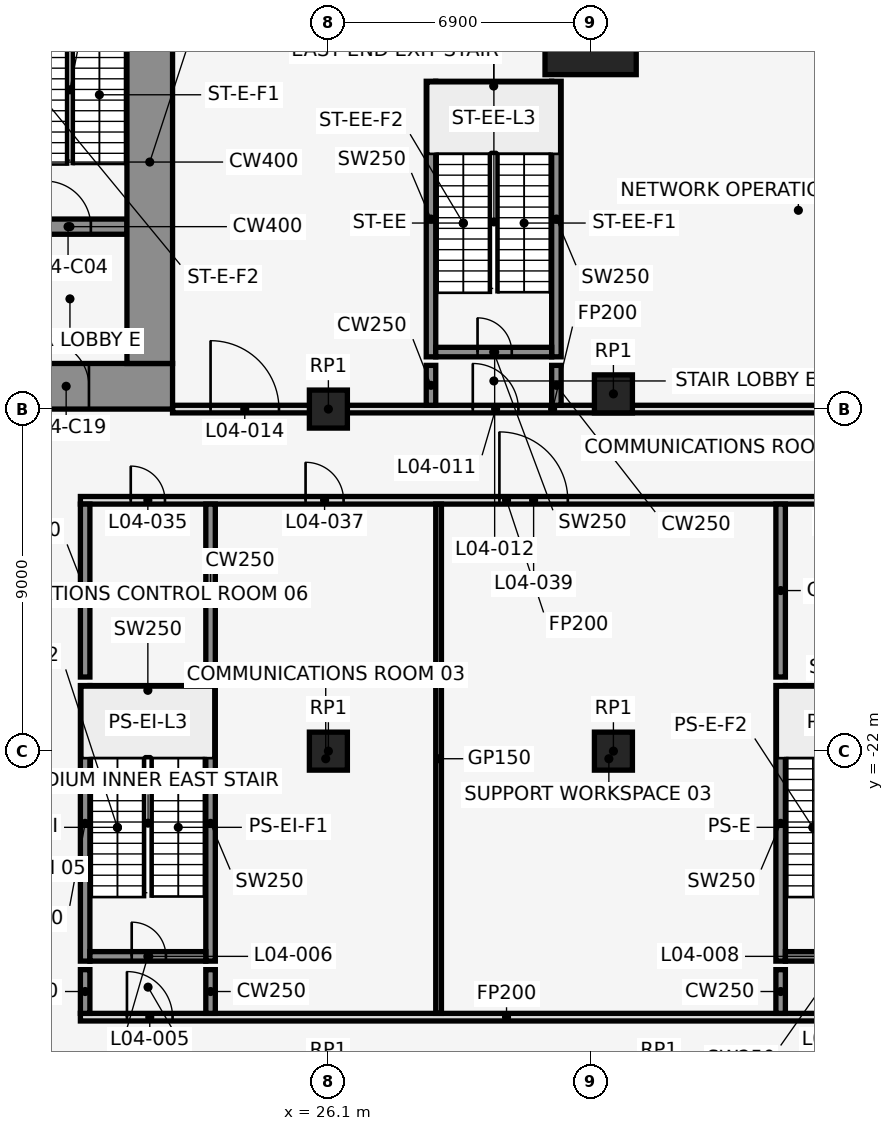
"""IFC4 building model, lengths in metres.
Left out: names, types, materials, properties, quantities, classifications, styles, units other than length and angle.
Written with IfcOpenShell. Run it as: python <this file> out.ifc"""

import sys

from ifc_helpers import new_model, si_unit, direction, frame, frame_2d, origin, origin_2d, place, context, subcontext, project, spatial, rectangle, extrude, element, fill, save


model = new_model("IFC4")
c1 = context("Model", 3, precision=1e-05, world=origin(), true_north=direction((0.0, 1.0)))
c2 = subcontext(c1, "Body", "Model", "MODEL_VIEW")
j1 = project(units=[si_unit("LENGTHUNIT", "METRE"), si_unit("PLANEANGLEUNIT", "RADIAN")], contexts=[c1])
p1 = place(None, origin())
s1 = spatial("IfcSite", under=j1, at=p1, CompositionType="ELEMENT")
p2 = place(p1, origin())
s2 = spatial("IfcBuilding", under=s1, at=p2, CompositionType="ELEMENT")
p3 = place(p2, frame((0.0, 0.0, 25.0)))
s3 = spatial("IfcBuildingStorey", under=s2, at=p3, CompositionType="ELEMENT", Elevation=25.0)
p4 = place(p3, frame((33.0, -3.0, 0.0), z_axis=(0.0, 0.0, 1.0), x_axis=(1.0, 0.0, 0.0)))
e1 = element("IfcColumn", 1, at=p4, inside=s3, PredefinedType="COLUMN", context=c2, shape_type="SweptSolid", body=[
    extrude(rectangle(XDim=2.4, YDim=2.4, at=origin_2d()), origin(), (0.0, 0.0, 1.0), 5.0),
])
for number, where, z_axis, x_axis in (
    (2, (33.6, -12.6, 0.0), (0.0, 0.0, 1.0), (1.0, 0.0, 0.0)),
    (3, (33.6, -22.0, 0.0), (0.0, 0.0, 1.0), (1.0, 0.0, 0.0)),
    (4, (26.1, -22.0, 0.0), (0.0, 0.0, 1.0), (1.0, 0.0, 0.0)),
    (5, (26.1, -13.0, 0.0), (0.0, 0.0, 1.0), (1.0, 0.0, 0.0)),
):
    element("IfcColumn", number, at=place(p3, frame(where, z_axis=z_axis, x_axis=x_axis)), inside=s3, PredefinedType="COLUMN", context=c2, shape_type="SweptSolid", body=[
        extrude(rectangle(XDim=1.0, YDim=1.0, at=origin_2d()), origin(), (0.0, 0.0, 1.0), 5.0),
    ])
for number, where, z_axis, x_axis in (
    (6, (28.8, -11.625, 0.0), (0.0, 0.0, 1.0), (0.0, 1.0, 0.0)),
    (7, (32.1, -11.625, 0.0), (0.0, 0.0, 1.0), (0.0, 1.0, 0.0)),
):
    element("IfcWall", number, at=place(p3, frame(where, z_axis=z_axis, x_axis=x_axis)), inside=s3, PredefinedType="SHEAR", context=c2, shape_type="SweptSolid", body=[
        extrude(rectangle(XDim=7.25, YDim=0.25, at=frame_2d((3.625, 0.0))), origin(), (0.0, 0.0, 1.0), 5.0),
    ])
p5 = place(p3, frame((28.925, -11.5, 0.0), z_axis=(0.0, 0.0, 1.0), x_axis=(1.0, 0.0, 0.0)))
e8 = element("IfcWall", 8, at=p5, inside=s3, PredefinedType="SHEAR", context=c2, shape_type="SweptSolid", body=[
    extrude(rectangle(XDim=3.05, YDim=0.25, at=frame_2d((1.525, 0.0))), origin(), (0.0, 0.0, 1.0), 5.0),
])
p6 = place(p5, frame((1.1, 0.0, 0.0)))
e9 = element("IfcOpeningElement", 9, at=p6, cuts=e8, PredefinedType="OPENING", context=c2, shape_type="SweptSolid", body=[
    extrude(rectangle(XDim=0.9, YDim=2.1, at=frame_2d((0.45, 1.05))), frame((0.0, 0.137, 0.0), z_axis=(0.0, -1.0, 0.0), x_axis=(1.0, 0.0, 0.0)), (0.0, 0.0, 1.0), 0.274),
])
p7 = place(p3, frame((28.925, -4.5, 0.0), z_axis=(0.0, 0.0, 1.0), x_axis=(1.0, 0.0, 0.0)))
e10 = element("IfcWall", 10, at=p7, inside=s3, PredefinedType="SHEAR", context=c2, shape_type="SweptSolid", body=[
    extrude(rectangle(XDim=3.05, YDim=0.25, at=frame_2d((1.525, 0.0))), origin(), (0.0, 0.0, 1.0), 5.0),
])
for number, where, z_axis, x_axis in (
    (11, (19.7, -27.525, 0.0), (0.0, 0.0, 1.0), (0.0, 1.0, 0.0)),
    (12, (23.0, -27.525, 0.0), (0.0, 0.0, 1.0), (0.0, 1.0, 0.0)),
):
    element("IfcWall", number, at=place(p3, frame(where, z_axis=z_axis, x_axis=x_axis)), inside=s3, PredefinedType="SHEAR", context=c2, shape_type="SweptSolid", body=[
        extrude(rectangle(XDim=7.25, YDim=0.25, at=frame_2d((3.625, 0.0))), origin(), (0.0, 0.0, 1.0), 5.0),
    ])
p8 = place(p3, frame((19.825, -27.4, 0.0), z_axis=(0.0, 0.0, 1.0), x_axis=(1.0, 0.0, 0.0)))
e13 = element("IfcWall", 13, at=p8, inside=s3, PredefinedType="SHEAR", context=c2, shape_type="SweptSolid", body=[
    extrude(rectangle(XDim=3.05, YDim=0.25, at=frame_2d((1.525, 0.0))), origin(), (0.0, 0.0, 1.0), 5.0),
])
p9 = place(p8, frame((1.1, 0.0, 0.0)))
e14 = element("IfcOpeningElement", 14, at=p9, cuts=e13, PredefinedType="OPENING", context=c2, shape_type="SweptSolid", body=[
    extrude(rectangle(XDim=0.9, YDim=2.1, at=frame_2d((0.45, 1.05))), frame((0.0, 0.137, 0.0), z_axis=(0.0, -1.0, 0.0), x_axis=(1.0, 0.0, 0.0)), (0.0, 0.0, 1.0), 0.274),
])
p10 = place(p3, frame((19.825, -20.4, 0.0), z_axis=(0.0, 0.0, 1.0), x_axis=(1.0, 0.0, 0.0)))
e15 = element("IfcWall", 15, at=p10, inside=s3, PredefinedType="SHEAR", context=c2, shape_type="SweptSolid", body=[
    extrude(rectangle(XDim=3.05, YDim=0.25, at=frame_2d((1.525, 0.0))), origin(), (0.0, 0.0, 1.0), 5.0),
])
p11 = place(p3, frame((38.0, -27.525, 0.0), z_axis=(0.0, 0.0, 1.0), x_axis=(0.0, 1.0, 0.0)))
e16 = element("IfcWall", 16, at=p11, inside=s3, PredefinedType="SHEAR", context=c2, shape_type="SweptSolid", body=[
    extrude(rectangle(XDim=7.25, YDim=0.25, at=frame_2d((3.625, 0.0))), origin(), (0.0, 0.0, 1.0), 5.0),
])
p12 = place(p3, frame((38.125, -27.4, 0.0), z_axis=(0.0, 0.0, 1.0), x_axis=(1.0, 0.0, 0.0)))
e17 = element("IfcWall", 17, at=p12, inside=s3, PredefinedType="SHEAR", context=c2, shape_type="SweptSolid", body=[
    extrude(rectangle(XDim=3.05, YDim=0.25, at=frame_2d((1.525, 0.0))), origin(), (0.0, 0.0, 1.0), 5.0),
])
p13 = place(p12, frame((1.1, 0.0, 0.0)))
e18 = element("IfcOpeningElement", 18, at=p13, cuts=e17, PredefinedType="OPENING", context=c2, shape_type="SweptSolid", body=[
    extrude(rectangle(XDim=0.9, YDim=2.1, at=frame_2d((0.45, 1.05))), frame((0.0, 0.137, 0.0), z_axis=(0.0, -1.0, 0.0), x_axis=(1.0, 0.0, 0.0)), (0.0, 0.0, 1.0), 0.274),
])
p14 = place(p3, frame((38.125, -20.4, 0.0), z_axis=(0.0, 0.0, 1.0), x_axis=(1.0, 0.0, 0.0)))
e19 = element("IfcWall", 19, at=p14, inside=s3, PredefinedType="SHEAR", context=c2, shape_type="SweptSolid", body=[
    extrude(rectangle(XDim=3.05, YDim=0.25, at=frame_2d((1.525, 0.0))), origin(), (0.0, 0.0, 1.0), 5.0),
])
p15 = place(p3, frame((19.575, -29.0, 0.0), z_axis=(0.0, 0.0, 1.0), x_axis=(1.0, 0.0, 0.0)))
e20 = element("IfcWall", 20, at=p15, inside=s3, PredefinedType="PARTITIONING", context=c2, shape_type="SweptSolid", body=[
    extrude(rectangle(XDim=22.425, YDim=0.2, at=frame_2d((11.212, 0.0))), origin(), (0.0, 0.0, 1.0), 4.7),
])
p16 = place(p15, frame((1.225, 0.0, 0.0)))
e21 = element("IfcOpeningElement", 21, at=p16, cuts=e20, PredefinedType="OPENING", context=c2, shape_type="SweptSolid", body=[
    extrude(rectangle(XDim=1.2, YDim=2.1, at=frame_2d((0.6, 1.05))), frame((0.0, 0.112, 0.0), z_axis=(0.0, -1.0, 0.0), x_axis=(1.0, 0.0, 0.0)), (0.0, 0.0, 1.0), 0.224),
])
p17 = place(p15, frame((19.425, 0.0, 0.0)))
e22 = element("IfcOpeningElement", 22, at=p17, cuts=e20, PredefinedType="OPENING", context=c2, shape_type="SweptSolid", body=[
    extrude(rectangle(XDim=1.2, YDim=2.1, at=frame_2d((0.6, 1.05))), frame((0.0, 0.112, 0.0), z_axis=(0.0, -1.0, 0.0), x_axis=(1.0, 0.0, 0.0)), (0.0, 0.0, 1.0), 0.224),
])
p18 = place(p3, frame((19.575, -15.4, 0.0), z_axis=(0.0, 0.0, 1.0), x_axis=(1.0, 0.0, 0.0)))
e23 = element("IfcWall", 23, at=p18, inside=s3, PredefinedType="PARTITIONING", context=c2, shape_type="SweptSolid", body=[
    extrude(rectangle(XDim=22.425, YDim=0.2, at=frame_2d((11.212, 0.0))), origin(), (0.0, 0.0, 1.0), 4.7),
])
p19 = place(p18, frame((1.325, 0.0, 0.0)))
e24 = element("IfcOpeningElement", 24, at=p19, cuts=e23, PredefinedType="OPENING", context=c2, shape_type="SweptSolid", body=[
    extrude(rectangle(XDim=0.9, YDim=2.1, at=frame_2d((0.45, 1.05))), frame((0.0, 0.112, 0.0), z_axis=(0.0, -1.0, 0.0), x_axis=(1.0, 0.0, 0.0)), (0.0, 0.0, 1.0), 0.224),
])
p20 = place(p18, frame((5.925, 0.0, 0.0)))
e25 = element("IfcOpeningElement", 25, at=p20, cuts=e23, PredefinedType="OPENING", context=c2, shape_type="SweptSolid", body=[
    extrude(rectangle(XDim=1.0, YDim=2.1, at=frame_2d((0.5, 1.05))), frame((0.0, 0.112, 0.0), z_axis=(0.0, -1.0, 0.0), x_axis=(1.0, 0.0, 0.0)), (0.0, 0.0, 1.0), 0.224),
])
p21 = place(p18, frame((11.025, 0.0, 0.0)))
e26 = element("IfcOpeningElement", 26, at=p21, cuts=e23, PredefinedType="OPENING", context=c2, shape_type="SweptSolid", body=[
    extrude(rectangle(XDim=1.8, YDim=2.1, at=frame_2d((0.9, 1.05))), frame((0.0, 0.112, 0.0), z_axis=(0.0, -1.0, 0.0), x_axis=(1.0, 0.0, 0.0)), (0.0, 0.0, 1.0), 0.224),
])
p22 = place(p18, frame((19.925, 0.0, 0.0)))
e27 = element("IfcOpeningElement", 27, at=p22, cuts=e23, PredefinedType="OPENING", context=c2, shape_type="SweptSolid", body=[
    extrude(rectangle(XDim=0.9, YDim=2.1, at=frame_2d((0.45, 1.05))), frame((0.0, 0.112, 0.0), z_axis=(0.0, -1.0, 0.0), x_axis=(1.0, 0.0, 0.0)), (0.0, 0.0, 1.0), 0.224),
])
p23 = place(p3, frame((22.0, -13.0, 0.0), z_axis=(0.0, 0.0, 1.0), x_axis=(1.0, 0.0, 0.0)))
e28 = element("IfcWall", 28, at=p23, inside=s3, PredefinedType="PARTITIONING", context=c2, shape_type="SweptSolid", body=[
    extrude(rectangle(XDim=20.0, YDim=0.2, at=frame_2d((10.0, 0.0))), origin(), (0.0, 0.0, 1.0), 4.7),
])
p24 = place(p23, frame((7.9, 0.0, 0.0)))
e29 = element("IfcOpeningElement", 29, at=p24, cuts=e28, PredefinedType="OPENING", context=c2, shape_type="SweptSolid", body=[
    extrude(rectangle(XDim=1.2, YDim=2.1, at=frame_2d((0.6, 1.05))), frame((0.0, 0.112, 0.0), z_axis=(0.0, -1.0, 0.0), x_axis=(1.0, 0.0, 0.0)), (0.0, 0.0, 1.0), 0.224),
])
p25 = place(p23, frame((1.0, 0.0, 0.0)))
e30 = element("IfcOpeningElement", 30, at=p25, cuts=e28, PredefinedType="OPENING", context=c2, shape_type="SweptSolid", body=[
    extrude(rectangle(XDim=1.8, YDim=2.1, at=frame_2d((0.9, 1.05))), frame((0.0, 0.112, 0.0), z_axis=(0.0, -1.0, 0.0), x_axis=(1.0, 0.0, 0.0)), (0.0, 0.0, 1.0), 0.224),
])
p26 = place(p3, frame((19.7, -28.9, 0.0), z_axis=(0.0, 0.0, 1.0), x_axis=(0.0, 1.0, 0.0)))
e31 = element("IfcWall", 31, at=p26, inside=s3, PredefinedType="SHEAR", context=c2, shape_type="SweptSolid", body=[
    extrude(rectangle(XDim=1.15, YDim=0.25, at=frame_2d((0.575, 0.0))), origin(), (0.0, 0.0, 1.0), 5.0),
])
p27 = place(p3, frame((19.7, -20.05, 0.0), z_axis=(0.0, 0.0, 1.0), x_axis=(0.0, 1.0, 0.0)))
e32 = element("IfcWall", 32, at=p27, inside=s3, PredefinedType="SHEAR", context=c2, shape_type="SweptSolid", body=[
    extrude(rectangle(XDim=4.55, YDim=0.25, at=frame_2d((2.275, 0.0))), origin(), (0.0, 0.0, 1.0), 5.0),
])
p28 = place(p3, frame((23.0, -28.9, 0.0), z_axis=(0.0, 0.0, 1.0), x_axis=(0.0, 1.0, 0.0)))
e33 = element("IfcWall", 33, at=p28, inside=s3, PredefinedType="SHEAR", context=c2, shape_type="SweptSolid", body=[
    extrude(rectangle(XDim=1.15, YDim=0.25, at=frame_2d((0.575, 0.0))), origin(), (0.0, 0.0, 1.0), 5.0),
])
p29 = place(p3, frame((23.0, -20.05, 0.0), z_axis=(0.0, 0.0, 1.0), x_axis=(0.0, 1.0, 0.0)))
e34 = element("IfcWall", 34, at=p29, inside=s3, PredefinedType="SHEAR", context=c2, shape_type="SweptSolid", body=[
    extrude(rectangle(XDim=4.55, YDim=0.25, at=frame_2d((2.275, 0.0))), origin(), (0.0, 0.0, 1.0), 5.0),
])
p30 = place(p3, frame((28.8, -12.9, 0.0), z_axis=(0.0, 0.0, 1.0), x_axis=(0.0, 1.0, 0.0)))
e35 = element("IfcWall", 35, at=p30, inside=s3, PredefinedType="SHEAR", context=c2, shape_type="SweptSolid", body=[
    extrude(rectangle(XDim=1.05, YDim=0.25, at=frame_2d((0.525, 0.0))), origin(), (0.0, 0.0, 1.0), 5.0),
])
p31 = place(p3, frame((29.0, -28.9, 0.0), z_axis=(0.0, 0.0, 1.0), x_axis=(0.0, 1.0, 0.0)))
e36 = element("IfcWall", 36, at=p31, inside=s3, PredefinedType="PARTITIONING", context=c2, shape_type="SweptSolid", body=[
    extrude(rectangle(XDim=13.4, YDim=0.15, at=frame_2d((6.7, 0.0))), origin(), (0.0, 0.0, 1.0), 4.7),
])
p32 = place(p3, frame((32.1, -12.9, 0.0), z_axis=(0.0, 0.0, 1.0), x_axis=(0.0, 1.0, 0.0)))
e37 = element("IfcWall", 37, at=p32, inside=s3, PredefinedType="SHEAR", context=c2, shape_type="SweptSolid", body=[
    extrude(rectangle(XDim=1.05, YDim=0.25, at=frame_2d((0.525, 0.0))), origin(), (0.0, 0.0, 1.0), 5.0),
])
p33 = place(p3, frame((38.0, -28.9, 0.0), z_axis=(0.0, 0.0, 1.0), x_axis=(0.0, 1.0, 0.0)))
e38 = element("IfcWall", 38, at=p33, inside=s3, PredefinedType="SHEAR", context=c2, shape_type="SweptSolid", body=[
    extrude(rectangle(XDim=1.15, YDim=0.25, at=frame_2d((0.575, 0.0))), origin(), (0.0, 0.0, 1.0), 5.0),
])
p34 = place(p3, frame((38.0, -20.05, 0.0), z_axis=(0.0, 0.0, 1.0), x_axis=(0.0, 1.0, 0.0)))
e39 = element("IfcWall", 39, at=p34, inside=s3, PredefinedType="SHEAR", context=c2, shape_type="SweptSolid", body=[
    extrude(rectangle(XDim=4.55, YDim=0.25, at=frame_2d((2.275, 0.0))), origin(), (0.0, 0.0, 1.0), 5.0),
])
p35 = place(p3, frame((17.8, -8.2, 0.0), z_axis=(0.0, 0.0, 1.0), x_axis=(1.0, 0.0, 0.0)))
e40 = element("IfcWall", 40, at=p35, inside=s3, PredefinedType="SHEAR", context=c2, shape_type="SweptSolid", body=[
    extrude(rectangle(XDim=3.0, YDim=0.4, at=frame_2d((1.5, 0.0))), origin(), (0.0, 0.0, 1.0), 5.0),
])
p36 = place(p35, frame((0.85, 0.0, 0.0)))
e41 = element("IfcOpeningElement", 41, at=p36, cuts=e40, PredefinedType="OPENING", context=c2, shape_type="SweptSolid", body=[
    extrude(rectangle(XDim=1.2, YDim=2.1, at=frame_2d((0.6, 1.05))), frame((0.0, 0.212, 0.0), z_axis=(0.0, -1.0, 0.0), x_axis=(1.0, 0.0, 0.0)), (0.0, 0.0, 1.0), 0.424),
])
p37 = place(p3, frame((-22.0, -12.4, 0.0), z_axis=(0.0, 0.0, 1.0), x_axis=(1.0, 0.0, 0.0)))
e42 = element("IfcWall", 42, at=p37, inside=s3, PredefinedType="SHEAR", context=c2, shape_type="SweptSolid", body=[
    extrude(rectangle(XDim=44.0, YDim=1.2, at=frame_2d((22.0, 0.0))), origin(), (0.0, 0.0, 1.0), 5.0),
])
p38 = place(p37, frame((2.2, 0.0, 0.0)))
e43 = element("IfcOpeningElement", 43, at=p38, cuts=e42, PredefinedType="OPENING", context=c2, shape_type="SweptSolid", body=[
    extrude(rectangle(XDim=1.2, YDim=2.1, at=frame_2d((0.6, 1.05))), frame((0.0, 0.612, 0.0), z_axis=(0.0, -1.0, 0.0), x_axis=(1.0, 0.0, 0.0)), (0.0, 0.0, 1.0), 1.224),
])
p39 = place(p37, frame((21.4, 0.0, 0.0)))
e44 = element("IfcOpeningElement", 44, at=p39, cuts=e42, PredefinedType="OPENING", context=c2, shape_type="SweptSolid", body=[
    extrude(rectangle(XDim=1.2, YDim=2.1, at=frame_2d((0.6, 1.05))), frame((0.0, 0.612, 0.0), z_axis=(0.0, -1.0, 0.0), x_axis=(1.0, 0.0, 0.0)), (0.0, 0.0, 1.0), 1.224),
])
p40 = place(p37, frame((40.6, 0.0, 0.0)))
e45 = element("IfcOpeningElement", 45, at=p40, cuts=e42, PredefinedType="OPENING", context=c2, shape_type="SweptSolid", body=[
    extrude(rectangle(XDim=1.2, YDim=2.1, at=frame_2d((0.6, 1.05))), frame((0.0, 0.612, 0.0), z_axis=(0.0, -1.0, 0.0), x_axis=(1.0, 0.0, 0.0)), (0.0, 0.0, 1.0), 1.224),
])
p41 = place(p37, frame((16.0, 0.0, 0.0)))
e46 = element("IfcOpeningElement", 46, at=p41, cuts=e42, PredefinedType="OPENING", context=c2, shape_type="SweptSolid", body=[
    extrude(rectangle(XDim=1.8, YDim=2.1, at=frame_2d((0.9, 1.05))), frame((0.0, 0.612, 0.0), z_axis=(0.0, -1.0, 0.0), x_axis=(1.0, 0.0, 0.0)), (0.0, 0.0, 1.0), 1.224),
])
p42 = place(p37, frame((6.3, 0.0, 0.0)))
e47 = element("IfcOpeningElement", 47, at=p42, cuts=e42, PredefinedType="OPENING", context=c2, shape_type="SweptSolid", body=[
    extrude(rectangle(XDim=1.2, YDim=2.1, at=frame_2d((0.6, 1.05))), frame((0.0, 0.612, 0.0), z_axis=(0.0, -1.0, 0.0), x_axis=(1.0, 0.0, 0.0)), (0.0, 0.0, 1.0), 1.224),
])
p43 = place(p37, frame((26.2, 0.0, 0.0)))
e48 = element("IfcOpeningElement", 48, at=p43, cuts=e42, PredefinedType="OPENING", context=c2, shape_type="SweptSolid", body=[
    extrude(rectangle(XDim=1.8, YDim=2.1, at=frame_2d((0.9, 1.05))), frame((0.0, 0.612, 0.0), z_axis=(0.0, -1.0, 0.0), x_axis=(1.0, 0.0, 0.0)), (0.0, 0.0, 1.0), 1.224),
])
p44 = place(p37, frame((36.5, 0.0, 0.0)))
e49 = element("IfcOpeningElement", 49, at=p44, cuts=e42, PredefinedType="OPENING", context=c2, shape_type="SweptSolid", body=[
    extrude(rectangle(XDim=1.2, YDim=2.1, at=frame_2d((0.6, 1.05))), frame((0.0, 0.612, 0.0), z_axis=(0.0, -1.0, 0.0), x_axis=(1.0, 0.0, 0.0)), (0.0, 0.0, 1.0), 1.224),
])
p45 = place(p3, frame((21.4, -11.8, 0.0), z_axis=(0.0, 0.0, 1.0), x_axis=(0.0, 1.0, 0.0)))
e50 = element("IfcWall", 50, at=p45, inside=s3, PredefinedType="SHEAR", context=c2, shape_type="SweptSolid", body=[
    extrude(rectangle(XDim=10.6, YDim=1.2, at=frame_2d((5.3, 0.0))), origin(), (0.0, 0.0, 1.0), 5.0),
])
p46 = place(p16, origin())
e51 = element("IfcDoor", 51, at=p46, inside=s3, OperationType="SINGLE_SWING_LEFT", PredefinedType="DOOR", context=c2, shape_type="SweptSolid", body=[
    extrude(rectangle(XDim=1.2, YDim=2.1, at=frame_2d((0.6, 1.05))), frame((0.0, 0.025, 0.0), z_axis=(0.0, -1.0, 0.0), x_axis=(1.0, 0.0, 0.0)), (0.0, 0.0, 1.0), 0.05),
])
fill(e21, e51)
p47 = place(p9, origin())
e52 = element("IfcDoor", 52, at=p47, inside=s3, OperationType="SINGLE_SWING_RIGHT", PredefinedType="DOOR", context=c2, shape_type="SweptSolid", body=[
    extrude(rectangle(XDim=0.9, YDim=2.1, at=frame_2d((0.45, 1.05))), frame((0.0, 0.025, 0.0), z_axis=(0.0, -1.0, 0.0), x_axis=(1.0, 0.0, 0.0)), (0.0, 0.0, 1.0), 0.05),
])
fill(e14, e52)
p48 = place(p24, origin())
e53 = element("IfcDoor", 53, at=p48, inside=s3, OperationType="SINGLE_SWING_LEFT", PredefinedType="DOOR", context=c2, shape_type="SweptSolid", body=[
    extrude(rectangle(XDim=1.2, YDim=2.1, at=frame_2d((0.6, 1.05))), frame((0.0, 0.025, 0.0), z_axis=(0.0, -1.0, 0.0), x_axis=(1.0, 0.0, 0.0)), (0.0, 0.0, 1.0), 0.05),
])
fill(e29, e53)
p49 = place(p6, origin())
e54 = element("IfcDoor", 54, at=p49, inside=s3, OperationType="SINGLE_SWING_RIGHT", PredefinedType="DOOR", context=c2, shape_type="SweptSolid", body=[
    extrude(rectangle(XDim=0.9, YDim=2.1, at=frame_2d((0.45, 1.05))), frame((0.0, 0.025, 0.0), z_axis=(0.0, -1.0, 0.0), x_axis=(1.0, 0.0, 0.0)), (0.0, 0.0, 1.0), 0.05),
])
fill(e9, e54)
p50 = place(p25, origin())
e55 = element("IfcDoor", 55, at=p50, inside=s3, OperationType="SINGLE_SWING_LEFT", PredefinedType="DOOR", context=c2, shape_type="SweptSolid", body=[
    extrude(rectangle(XDim=1.8, YDim=2.1, at=frame_2d((0.9, 1.05))), frame((0.0, 0.025, 0.0), z_axis=(0.0, -1.0, 0.0), x_axis=(1.0, 0.0, 0.0)), (0.0, 0.0, 1.0), 0.05),
])
fill(e30, e55)
p51 = place(p19, frame((0.9, 0.0, 0.0), z_axis=(0.0, 0.0, 1.0), x_axis=(-1.0, 0.0, 0.0)))
e56 = element("IfcDoor", 56, at=p51, inside=s3, OperationType="SINGLE_SWING_RIGHT", PredefinedType="DOOR", context=c2, shape_type="SweptSolid", body=[
    extrude(rectangle(XDim=0.9, YDim=2.1, at=frame_2d((0.45, 1.05))), frame((0.0, 0.025, 0.0), z_axis=(0.0, -1.0, 0.0), x_axis=(1.0, 0.0, 0.0)), (0.0, 0.0, 1.0), 0.05),
])
fill(e24, e56)
p52 = place(p20, frame((1.0, 0.0, 0.0), z_axis=(0.0, 0.0, 1.0), x_axis=(-1.0, 0.0, 0.0)))
e57 = element("IfcDoor", 57, at=p52, inside=s3, OperationType="SINGLE_SWING_LEFT", PredefinedType="DOOR", context=c2, shape_type="SweptSolid", body=[
    extrude(rectangle(XDim=1.0, YDim=2.1, at=frame_2d((0.5, 1.05))), frame((0.0, 0.025, 0.0), z_axis=(0.0, -1.0, 0.0), x_axis=(1.0, 0.0, 0.0)), (0.0, 0.0, 1.0), 0.05),
])
fill(e25, e57)
p53 = place(p21, origin())
e58 = element("IfcDoor", 58, at=p53, inside=s3, OperationType="SINGLE_SWING_LEFT", PredefinedType="DOOR", context=c2, shape_type="SweptSolid", body=[
    extrude(rectangle(XDim=1.8, YDim=2.1, at=frame_2d((0.9, 1.05))), frame((0.0, 0.025, 0.0), z_axis=(0.0, -1.0, 0.0), x_axis=(1.0, 0.0, 0.0)), (0.0, 0.0, 1.0), 0.05),
])
fill(e26, e58)
p54 = place(p36, origin())
e59 = element("IfcDoor", 59, at=p54, inside=s3, OperationType="SINGLE_SWING_RIGHT", PredefinedType="DOOR", context=c2, shape_type="SweptSolid", body=[
    extrude(rectangle(XDim=1.2, YDim=2.1, at=frame_2d((0.6, 1.05))), frame((0.0, 0.025, 0.0), z_axis=(0.0, -1.0, 0.0), x_axis=(1.0, 0.0, 0.0)), (0.0, 0.0, 1.0), 0.05),
])
fill(e41, e59)
p55 = place(p40, frame((1.2, 0.0, 0.0), z_axis=(0.0, 0.0, 1.0), x_axis=(-1.0, 0.0, 0.0)))
e60 = element("IfcDoor", 60, at=p55, inside=s3, OperationType="SINGLE_SWING_RIGHT", PredefinedType="DOOR", context=c2, shape_type="SweptSolid", body=[
    extrude(rectangle(XDim=1.2, YDim=2.1, at=frame_2d((0.6, 1.05))), frame((0.0, 0.025, 0.0), z_axis=(0.0, -1.0, 0.0), x_axis=(1.0, 0.0, 0.0)), (0.0, 0.0, 1.0), 0.05),
])
fill(e45, e60)
save(model, sys.argv[1])
